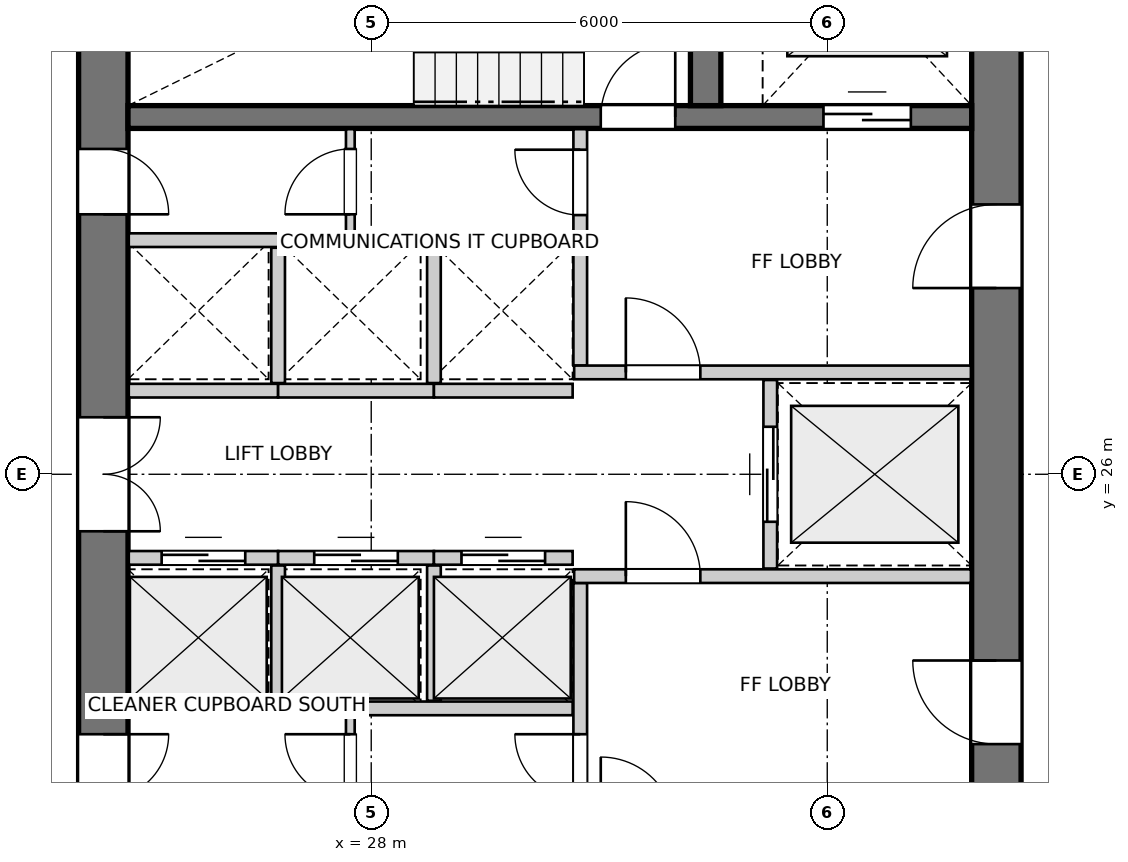
"""IFC4 building model, lengths in metres.
Left out: names, types, materials, properties, quantities, classifications, styles, units other than length and angle.
Written with IfcOpenShell. Run it as: python <this file> out.ifc"""

import sys

from ifc_helpers import new_model, si_unit, direction, frame, frame_2d, origin, place, context, subcontext, project, spatial, rectangle, extrude, source, transform, mapped, element, fill, save


model = new_model("IFC4")
c1 = context("Model", 3, precision=1e-05, world=origin(), true_north=direction((0.0, 1.0)))
c2 = subcontext(c1, "Body", "Model", "MODEL_VIEW")
j1 = project(units=[si_unit("LENGTHUNIT", "METRE"), si_unit("PLANEANGLEUNIT", "RADIAN")], contexts=[c1])
p1 = place(None, origin())
s1 = spatial("IfcSite", under=j1, at=p1, CompositionType="ELEMENT")
p2 = place(p1, origin())
s2 = spatial("IfcBuilding", under=s1, at=p2, CompositionType="ELEMENT")
p3 = place(p2, frame((0.0, 0.0, 112.0)))
s3 = spatial("IfcBuildingStorey", under=s2, at=p3, CompositionType="ELEMENT", Elevation=112.0)
p4 = place(p3, frame((24.475, 33.8, 0.0), z_axis=(0.0, 0.0, 1.0), x_axis=(0.0, -1.0, 0.0)))
e1 = element("IfcWall", 1, at=p4, inside=s3, PredefinedType="SHEAR", context=c2, shape_type="SweptSolid", body=[
    extrude(rectangle(XDim=15.6, YDim=0.65, at=frame_2d((7.8, 0.0))), origin(), (0.0, 0.0, 1.0), 2.935),
])
p5 = place(p4, frame((7.05, 0.0, 0.0)))
e2 = element("IfcOpeningElement", 2, at=p5, cuts=e1, PredefinedType="OPENING", context=c2, shape_type="SweptSolid", body=[
    extrude(rectangle(XDim=1.5, YDim=2.15, at=frame_2d((0.75, 1.075))), frame((0.0, 0.335, 0.0), z_axis=(0.0, -1.0, 0.0), x_axis=(1.0, 0.0, 0.0)), (0.0, 0.0, 1.0), 0.67),
])
p6 = place(p4, frame((3.52, 0.0, 0.0)))
e3 = element("IfcOpeningElement", 3, at=p6, cuts=e1, PredefinedType="OPENING", context=c2, shape_type="SweptSolid", body=[
    extrude(rectangle(XDim=0.86, YDim=2.05, at=frame_2d((0.43, 1.025))), frame((0.0, 0.335, 0.0), z_axis=(0.0, -1.0, 0.0), x_axis=(1.0, 0.0, 0.0)), (0.0, 0.0, 1.0), 0.67),
])
p7 = place(p4, frame((11.22, 0.0, 0.0)))
e4 = element("IfcOpeningElement", 4, at=p7, cuts=e1, PredefinedType="OPENING", context=c2, shape_type="SweptSolid", body=[
    extrude(rectangle(XDim=0.86, YDim=2.05, at=frame_2d((0.43, 1.025))), frame((0.0, 0.335, 0.0), z_axis=(0.0, -1.0, 0.0), x_axis=(1.0, 0.0, 0.0)), (0.0, 0.0, 1.0), 0.67),
])
p8 = place(p3, frame((36.225, 18.2, 0.0), z_axis=(0.0, 0.0, 1.0), x_axis=(0.0, 1.0, 0.0)))
e5 = element("IfcWall", 5, at=p8, inside=s3, PredefinedType="SHEAR", context=c2, shape_type="SweptSolid", body=[
    extrude(rectangle(XDim=15.6, YDim=0.65, at=frame_2d((7.8, 0.0))), origin(), (0.0, 0.0, 1.0), 2.935),
])
p9 = place(p8, frame((4.25, 0.0, 0.0)))
e6 = element("IfcOpeningElement", 6, at=p9, cuts=e5, PredefinedType="OPENING", context=c2, shape_type="SweptSolid", body=[
    extrude(rectangle(XDim=1.1, YDim=2.15, at=frame_2d((0.55, 1.075))), frame((0.0, 0.335, 0.0), z_axis=(0.0, -1.0, 0.0), x_axis=(1.0, 0.0, 0.0)), (0.0, 0.0, 1.0), 0.67),
])
p10 = place(p8, frame((10.25, 0.0, 0.0)))
e7 = element("IfcOpeningElement", 7, at=p10, cuts=e5, PredefinedType="OPENING", context=c2, shape_type="SweptSolid", body=[
    extrude(rectangle(XDim=1.1, YDim=2.15, at=frame_2d((0.55, 1.075))), frame((0.0, 0.335, 0.0), z_axis=(0.0, -1.0, 0.0), x_axis=(1.0, 0.0, 0.0)), (0.0, 0.0, 1.0), 0.67),
])
p11 = place(p3, frame((24.8, 30.7, 0.0), z_axis=(0.0, 0.0, 1.0), x_axis=(1.0, 0.0, 0.0)))
e8 = element("IfcWall", 8, at=p11, inside=s3, PredefinedType="SHEAR", context=c2, shape_type="SweptSolid", body=[
    extrude(rectangle(XDim=11.1, YDim=0.3, at=frame_2d((5.55, 0.0))), origin(), (0.0, 0.0, 1.0), 2.935),
])
p12 = place(p11, frame((6.22, 0.0, 0.0)))
e9 = element("IfcOpeningElement", 9, at=p12, cuts=e8, PredefinedType="OPENING", context=c2, shape_type="SweptSolid", body=[
    extrude(rectangle(XDim=0.98, YDim=2.15, at=frame_2d((0.49, 1.075))), frame((0.0, 0.16, 0.0), z_axis=(0.0, -1.0, 0.0), x_axis=(1.0, 0.0, 0.0)), (0.0, 0.0, 1.0), 0.32),
])
p13 = place(p11, frame((9.15, 0.0, 0.0)))
e10 = element("IfcOpeningElement", 10, at=p13, cuts=e8, PredefinedType="OPENING", context=c2, shape_type="SweptSolid", body=[
    extrude(rectangle(XDim=1.15, YDim=2.15, at=frame_2d((0.575, 1.075))), frame((0.0, 0.16, 0.0), z_axis=(0.0, -1.0, 0.0), x_axis=(1.0, 0.0, 0.0)), (0.0, 0.0, 1.0), 0.32),
])
p14 = place(p3, frame((32.4, 30.85, 0.0), z_axis=(0.0, 0.0, 1.0), x_axis=(0.0, 1.0, 0.0)))
e11 = element("IfcWall", 11, at=p14, inside=s3, PredefinedType="SHEAR", context=c2, shape_type="SweptSolid", body=[
    extrude(rectangle(XDim=2.95, YDim=0.4, at=frame_2d((1.475, 0.0))), origin(), (0.0, 0.0, 1.0), 2.935),
])
p15 = place(p3, frame((30.75, 21.46, 0.0), z_axis=(0.0, 0.0, 1.0), x_axis=(0.0, 1.0, 0.0)))
e12 = element("IfcWall", 12, at=p15, inside=s3, PredefinedType="PARTITIONING", context=c2, shape_type="SweptSolid", body=[
    extrude(rectangle(XDim=3.11, YDim=0.18, at=frame_2d((1.555, 0.0))), origin(), (0.0, 0.0, 1.0), 2.935),
])
p16 = place(p15, frame((0.26, 0.0, 0.0)))
e13 = element("IfcOpeningElement", 13, at=p16, cuts=e12, PredefinedType="OPENING", context=c2, shape_type="SweptSolid", body=[
    extrude(rectangle(XDim=0.86, YDim=2.05, at=frame_2d((0.43, 1.025))), frame((0.0, 0.1, 0.0), z_axis=(0.0, -1.0, 0.0), x_axis=(1.0, 0.0, 0.0)), (0.0, 0.0, 1.0), 0.2),
])
p17 = place(p3, frame((30.67, 24.66, 0.0), z_axis=(0.0, 0.0, 1.0), x_axis=(1.0, 0.0, 0.0)))
e14 = element("IfcWall", 14, at=p17, inside=s3, PredefinedType="PARTITIONING", context=c2, shape_type="SweptSolid", body=[
    extrude(rectangle(XDim=5.22, YDim=0.18, at=frame_2d((2.61, 0.0))), origin(), (0.0, 0.0, 1.0), 2.935),
])
p18 = place(p17, frame((0.68, 0.0, 0.0)))
e15 = element("IfcOpeningElement", 15, at=p18, cuts=e14, PredefinedType="OPENING", context=c2, shape_type="SweptSolid", body=[
    extrude(rectangle(XDim=0.98, YDim=2.15, at=frame_2d((0.49, 1.075))), frame((0.0, 0.1, 0.0), z_axis=(0.0, -1.0, 0.0), x_axis=(1.0, 0.0, 0.0)), (0.0, 0.0, 1.0), 0.2),
])
p19 = place(p3, frame((30.75, 27.43, 0.0), z_axis=(0.0, 0.0, 1.0), x_axis=(0.0, 1.0, 0.0)))
e16 = element("IfcWall", 16, at=p19, inside=s3, PredefinedType="PARTITIONING", context=c2, shape_type="SweptSolid", body=[
    extrude(rectangle(XDim=3.11, YDim=0.18, at=frame_2d((1.555, 0.0))), origin(), (0.0, 0.0, 1.0), 2.935),
])
p20 = place(p19, frame((1.98, 0.0, 0.0)))
e17 = element("IfcOpeningElement", 17, at=p20, cuts=e16, PredefinedType="OPENING", context=c2, shape_type="SweptSolid", body=[
    extrude(rectangle(XDim=0.86, YDim=2.05, at=frame_2d((0.43, 1.025))), frame((0.0, 0.1, 0.0), z_axis=(0.0, -1.0, 0.0), x_axis=(1.0, 0.0, 0.0)), (0.0, 0.0, 1.0), 0.2),
])
p21 = place(p3, frame((30.67, 27.34, 0.0), z_axis=(0.0, 0.0, 1.0), x_axis=(1.0, 0.0, 0.0)))
e18 = element("IfcWall", 18, at=p21, inside=s3, PredefinedType="PARTITIONING", context=c2, shape_type="SweptSolid", body=[
    extrude(rectangle(XDim=5.22, YDim=0.18, at=frame_2d((2.61, 0.0))), origin(), (0.0, 0.0, 1.0), 2.935),
])
p22 = place(p21, frame((0.68, 0.0, 0.0)))
e19 = element("IfcOpeningElement", 19, at=p22, cuts=e18, PredefinedType="OPENING", context=c2, shape_type="SweptSolid", body=[
    extrude(rectangle(XDim=0.98, YDim=2.15, at=frame_2d((0.49, 1.075))), frame((0.0, 0.1, 0.0), z_axis=(0.0, -1.0, 0.0), x_axis=(1.0, 0.0, 0.0)), (0.0, 0.0, 1.0), 0.2),
])
p23 = place(p3, frame((33.25, 24.76, 0.0), z_axis=(0.0, 0.0, 1.0), x_axis=(0.0, 1.0, 0.0)))
e20 = element("IfcWall", 20, at=p23, inside=s3, PredefinedType="PARTITIONING", context=c2, shape_type="SweptSolid", body=[
    extrude(rectangle(XDim=2.48, YDim=0.18, at=frame_2d((1.24, 0.0))), origin(), (0.0, 0.0, 1.0), 2.935),
])
p24 = place(p23, frame((0.615, 0.0, 0.0)))
e21 = element("IfcOpeningElement", 21, at=p24, cuts=e20, PredefinedType="OPENING", context=c2, shape_type="SweptSolid", body=[
    extrude(rectangle(XDim=1.25, YDim=2.15, at=frame_2d((0.625, 1.075))), frame((0.0, 0.1, 0.0), z_axis=(0.0, -1.0, 0.0), x_axis=(1.0, 0.0, 0.0)), (0.0, 0.0, 1.0), 0.2),
])
p25 = place(p3, frame((24.81, 22.92, 0.0), z_axis=(0.0, 0.0, 1.0), x_axis=(1.0, 0.0, 0.0)))
e22 = element("IfcWall", 22, at=p25, inside=s3, PredefinedType="PARTITIONING", context=c2, shape_type="SweptSolid", body=[
    extrude(rectangle(XDim=5.84, YDim=0.18, at=frame_2d((2.92, 0.0))), origin(), (0.0, 0.0, 1.0), 2.935),
])
p26 = place(p3, frame((24.81, 24.9, 0.0), z_axis=(0.0, 0.0, 1.0), x_axis=(1.0, 0.0, 0.0)))
e23 = element("IfcWall", 23, at=p26, inside=s3, PredefinedType="PARTITIONING", context=c2, shape_type="SweptSolid", body=[
    extrude(rectangle(XDim=1.965, YDim=0.18, at=frame_2d((0.982, 0.0))), origin(), (0.0, 0.0, 1.0), 2.935),
])
p27 = place(p26, frame((0.433, 0.0, 0.0)))
e24 = element("IfcOpeningElement", 24, at=p27, cuts=e23, PredefinedType="OPENING", context=c2, shape_type="SweptSolid", body=[
    extrude(rectangle(XDim=1.1, YDim=2.15, at=frame_2d((0.55, 1.075))), frame((0.0, 0.1, 0.0), z_axis=(0.0, -1.0, 0.0), x_axis=(1.0, 0.0, 0.0)), (0.0, 0.0, 1.0), 0.2),
])
p28 = place(p3, frame((26.775, 24.9, 0.0), z_axis=(0.0, 0.0, 1.0), x_axis=(1.0, 0.0, 0.0)))
e25 = element("IfcWall", 25, at=p28, inside=s3, PredefinedType="PARTITIONING", context=c2, shape_type="SweptSolid", body=[
    extrude(rectangle(XDim=2.05, YDim=0.18, at=frame_2d((1.025, 0.0))), origin(), (0.0, 0.0, 1.0), 2.935),
])
p29 = place(p28, frame((0.475, 0.0, 0.0)))
e26 = element("IfcOpeningElement", 26, at=p29, cuts=e25, PredefinedType="OPENING", context=c2, shape_type="SweptSolid", body=[
    extrude(rectangle(XDim=1.1, YDim=2.15, at=frame_2d((0.55, 1.075))), frame((0.0, 0.1, 0.0), z_axis=(0.0, -1.0, 0.0), x_axis=(1.0, 0.0, 0.0)), (0.0, 0.0, 1.0), 0.2),
])
p30 = place(p3, frame((26.775, 23.02, 0.0), z_axis=(0.0, 0.0, 1.0), x_axis=(0.0, 1.0, 0.0)))
e27 = element("IfcWall", 27, at=p30, inside=s3, PredefinedType="PARTITIONING", context=c2, shape_type="SweptSolid", body=[
    extrude(rectangle(XDim=1.78, YDim=0.18, at=frame_2d((0.89, 0.0))), origin(), (0.0, 0.0, 1.0), 2.935),
])
p31 = place(p3, frame((28.825, 24.9, 0.0), z_axis=(0.0, 0.0, 1.0), x_axis=(1.0, 0.0, 0.0)))
e28 = element("IfcWall", 28, at=p31, inside=s3, PredefinedType="PARTITIONING", context=c2, shape_type="SweptSolid", body=[
    extrude(rectangle(XDim=1.825, YDim=0.18, at=frame_2d((0.913, 0.0))), origin(), (0.0, 0.0, 1.0), 2.935),
])
p32 = place(p31, frame((0.363, 0.0, 0.0)))
e29 = element("IfcOpeningElement", 29, at=p32, cuts=e28, PredefinedType="OPENING", context=c2, shape_type="SweptSolid", body=[
    extrude(rectangle(XDim=1.1, YDim=2.15, at=frame_2d((0.55, 1.075))), frame((0.0, 0.1, 0.0), z_axis=(0.0, -1.0, 0.0), x_axis=(1.0, 0.0, 0.0)), (0.0, 0.0, 1.0), 0.2),
])
p33 = place(p3, frame((28.825, 23.02, 0.0), z_axis=(0.0, 0.0, 1.0), x_axis=(0.0, 1.0, 0.0)))
e30 = element("IfcWall", 30, at=p33, inside=s3, PredefinedType="PARTITIONING", context=c2, shape_type="SweptSolid", body=[
    extrude(rectangle(XDim=1.78, YDim=0.18, at=frame_2d((0.89, 0.0))), origin(), (0.0, 0.0, 1.0), 2.935),
])
p34 = place(p3, frame((24.81, 29.08, 0.0), z_axis=(0.0, 0.0, 1.0), x_axis=(1.0, 0.0, 0.0)))
e31 = element("IfcWall", 31, at=p34, inside=s3, PredefinedType="PARTITIONING", context=c2, shape_type="SweptSolid", body=[
    extrude(rectangle(XDim=5.84, YDim=0.18, at=frame_2d((2.92, 0.0))), origin(), (0.0, 0.0, 1.0), 2.935),
])
p35 = place(p3, frame((24.81, 27.1, 0.0), z_axis=(0.0, 0.0, 1.0), x_axis=(1.0, 0.0, 0.0)))
e32 = element("IfcWall", 32, at=p35, inside=s3, PredefinedType="PARTITIONING", context=c2, shape_type="SweptSolid", body=[
    extrude(rectangle(XDim=1.965, YDim=0.18, at=frame_2d((0.982, 0.0))), origin(), (0.0, 0.0, 1.0), 2.935),
])
p36 = place(p3, frame((26.775, 27.1, 0.0), z_axis=(0.0, 0.0, 1.0), x_axis=(1.0, 0.0, 0.0)))
e33 = element("IfcWall", 33, at=p36, inside=s3, PredefinedType="PARTITIONING", context=c2, shape_type="SweptSolid", body=[
    extrude(rectangle(XDim=2.05, YDim=0.18, at=frame_2d((1.025, 0.0))), origin(), (0.0, 0.0, 1.0), 2.935),
])
p37 = place(p3, frame((26.775, 27.2, 0.0), z_axis=(0.0, 0.0, 1.0), x_axis=(0.0, 1.0, 0.0)))
e34 = element("IfcWall", 34, at=p37, inside=s3, PredefinedType="PARTITIONING", context=c2, shape_type="SweptSolid", body=[
    extrude(rectangle(XDim=1.78, YDim=0.18, at=frame_2d((0.89, 0.0))), origin(), (0.0, 0.0, 1.0), 2.935),
])
p38 = place(p3, frame((28.825, 27.1, 0.0), z_axis=(0.0, 0.0, 1.0), x_axis=(1.0, 0.0, 0.0)))
e35 = element("IfcWall", 35, at=p38, inside=s3, PredefinedType="PARTITIONING", context=c2, shape_type="SweptSolid", body=[
    extrude(rectangle(XDim=1.825, YDim=0.18, at=frame_2d((0.913, 0.0))), origin(), (0.0, 0.0, 1.0), 2.935),
])
p39 = place(p3, frame((28.825, 27.2, 0.0), z_axis=(0.0, 0.0, 1.0), x_axis=(0.0, 1.0, 0.0)))
e36 = element("IfcWall", 36, at=p39, inside=s3, PredefinedType="PARTITIONING", context=c2, shape_type="SweptSolid", body=[
    extrude(rectangle(XDim=1.78, YDim=0.18, at=frame_2d((0.89, 0.0))), origin(), (0.0, 0.0, 1.0), 2.935),
])
p40 = place(p3, frame((27.725, 21.46, 0.0), z_axis=(0.0, 0.0, 1.0), x_axis=(0.0, 1.0, 0.0)))
e37 = element("IfcWall", 37, at=p40, inside=s3, PredefinedType="PARTITIONING", context=c2, shape_type="SweptSolid", body=[
    extrude(rectangle(XDim=1.38, YDim=0.115, at=frame_2d((0.69, 0.0))), origin(), (0.0, 0.0, 1.0), 2.935),
])
p41 = place(p40, frame((0.26, 0.0, 0.0)))
e38 = element("IfcOpeningElement", 38, at=p41, cuts=e37, PredefinedType="OPENING", context=c2, shape_type="SweptSolid", body=[
    extrude(rectangle(XDim=0.86, YDim=2.05, at=frame_2d((0.43, 1.025))), frame((0.0, 0.067, 0.0), z_axis=(0.0, -1.0, 0.0), x_axis=(1.0, 0.0, 0.0)), (0.0, 0.0, 1.0), 0.135),
])
p42 = place(p3, frame((27.725, 29.16, 0.0), z_axis=(0.0, 0.0, 1.0), x_axis=(0.0, 1.0, 0.0)))
e39 = element("IfcWall", 39, at=p42, inside=s3, PredefinedType="PARTITIONING", context=c2, shape_type="SweptSolid", body=[
    extrude(rectangle(XDim=1.38, YDim=0.115, at=frame_2d((0.69, 0.0))), origin(), (0.0, 0.0, 1.0), 2.935),
])
p43 = place(p42, frame((0.26, 0.0, 0.0)))
e40 = element("IfcOpeningElement", 40, at=p43, cuts=e39, PredefinedType="OPENING", context=c2, shape_type="SweptSolid", body=[
    extrude(rectangle(XDim=0.86, YDim=2.05, at=frame_2d((0.43, 1.025))), frame((0.0, 0.067, 0.0), z_axis=(0.0, -1.0, 0.0), x_axis=(1.0, 0.0, 0.0)), (0.0, 0.0, 1.0), 0.135),
])
m1 = source(origin(), c2, "Body", "SweptSolid", [
    extrude(rectangle(XDim=0.98, YDim=2.15, at=frame_2d((0.49, 1.075))), frame((0.0, 0.025, 0.0), z_axis=(0.0, -1.0, 0.0), x_axis=(1.0, 0.0, 0.0)), (0.0, 0.0, 1.0), 0.05),
])
p44 = place(p12, origin())
e41 = element("IfcDoor", 41, at=p44, inside=s3, OperationType="SINGLE_SWING_RIGHT", PredefinedType="DOOR", context=c2, shape_type="MappedRepresentation", body=[
    mapped(m1, transform((0.0, 0.0, 0.0), x_axis=(1.0, 0.0, 0.0), y_axis=(0.0, 1.0, 0.0), z_axis=(0.0, 0.0, 1.0), scale=1.0)),
])
fill(e9, e41)
m2 = source(origin(), c2, "Body", "SweptSolid", [
    extrude(rectangle(XDim=1.15, YDim=2.15, at=frame_2d((0.575, 1.075))), frame((0.0, 0.025, 0.0), z_axis=(0.0, -1.0, 0.0), x_axis=(1.0, 0.0, 0.0)), (0.0, 0.0, 1.0), 0.05),
])
p45 = place(p13, origin())
e42 = element("IfcDoor", 42, at=p45, inside=s3, OperationType="DOUBLE_DOOR_SLIDING", PredefinedType="DOOR", context=c2, shape_type="MappedRepresentation", body=[
    mapped(m2, transform((0.0, 0.0, 0.0), x_axis=(1.0, 0.0, 0.0), y_axis=(0.0, 1.0, 0.0), z_axis=(0.0, 0.0, 1.0), scale=1.0)),
])
fill(e10, e42)
m3 = source(origin(), c2, "Body", "SweptSolid", [
    extrude(rectangle(XDim=1.1, YDim=2.15, at=frame_2d((0.55, 1.075))), frame((0.0, 0.025, 0.0), z_axis=(0.0, -1.0, 0.0), x_axis=(1.0, 0.0, 0.0)), (0.0, 0.0, 1.0), 0.05),
])
p46 = place(p9, origin())
e43 = element("IfcDoor", 43, at=p46, inside=s3, OperationType="SINGLE_SWING_RIGHT", PredefinedType="DOOR", context=c2, shape_type="MappedRepresentation", body=[
    mapped(m3, transform((0.0, 0.0, 0.0), x_axis=(1.0, 0.0, 0.0), y_axis=(0.0, 1.0, 0.0), z_axis=(0.0, 0.0, 1.0), scale=1.0)),
])
fill(e6, e43)
p47 = place(p10, origin())
e44 = element("IfcDoor", 44, at=p47, inside=s3, OperationType="SINGLE_SWING_LEFT", PredefinedType="DOOR", context=c2, shape_type="MappedRepresentation", body=[
    mapped(m3, transform((0.0, 0.0, 0.0), x_axis=(1.0, 0.0, 0.0), y_axis=(0.0, 1.0, 0.0), z_axis=(0.0, 0.0, 1.0), scale=1.0)),
])
fill(e7, e44)
m4 = source(origin(), c2, "Body", "SweptSolid", [
    extrude(rectangle(XDim=1.5, YDim=2.15, at=frame_2d((0.75, 1.075))), frame((0.0, 0.025, 0.0), z_axis=(0.0, -1.0, 0.0), x_axis=(1.0, 0.0, 0.0)), (0.0, 0.0, 1.0), 0.05),
])
p48 = place(p5, origin())
e45 = element("IfcDoor", 45, at=p48, inside=s3, OperationType="DOUBLE_DOOR_SINGLE_SWING", PredefinedType="DOOR", context=c2, shape_type="MappedRepresentation", body=[
    mapped(m4, transform((0.0, 0.0, 0.0), x_axis=(1.0, 0.0, 0.0), y_axis=(0.0, 1.0, 0.0), z_axis=(0.0, 0.0, 1.0), scale=1.0)),
])
fill(e2, e45)
m5 = source(origin(), c2, "Body", "SweptSolid", [
    extrude(rectangle(XDim=0.86, YDim=2.05, at=frame_2d((0.43, 1.025))), frame((0.0, 0.025, 0.0), z_axis=(0.0, -1.0, 0.0), x_axis=(1.0, 0.0, 0.0)), (0.0, 0.0, 1.0), 0.05),
])
p49 = place(p6, origin())
e46 = element("IfcDoor", 46, at=p49, inside=s3, OperationType="SINGLE_SWING_RIGHT", PredefinedType="DOOR", context=c2, shape_type="MappedRepresentation", body=[
    mapped(m5, transform((0.0, 0.0, 0.0), x_axis=(1.0, 0.0, 0.0), y_axis=(0.0, 1.0, 0.0), z_axis=(0.0, 0.0, 1.0), scale=1.0)),
])
fill(e3, e46)
p50 = place(p7, origin())
e47 = element("IfcDoor", 47, at=p50, inside=s3, OperationType="SINGLE_SWING_LEFT", PredefinedType="DOOR", context=c2, shape_type="MappedRepresentation", body=[
    mapped(m5, transform((0.0, 0.0, 0.0), x_axis=(1.0, 0.0, 0.0), y_axis=(0.0, 1.0, 0.0), z_axis=(0.0, 0.0, 1.0), scale=1.0)),
])
fill(e4, e47)
p51 = place(p16, origin())
e48 = element("IfcDoor", 48, at=p51, inside=s3, OperationType="SINGLE_SWING_RIGHT", PredefinedType="DOOR", context=c2, shape_type="MappedRepresentation", body=[
    mapped(m5, transform((0.0, 0.0, 0.0), x_axis=(1.0, 0.0, 0.0), y_axis=(0.0, 1.0, 0.0), z_axis=(0.0, 0.0, 1.0), scale=1.0)),
])
fill(e13, e48)
p52 = place(p18, origin())
e49 = element("IfcDoor", 49, at=p52, inside=s3, OperationType="SINGLE_SWING_LEFT", PredefinedType="DOOR", context=c2, shape_type="MappedRepresentation", body=[
    mapped(m1, transform((0.0, 0.0, 0.0), x_axis=(1.0, 0.0, 0.0), y_axis=(0.0, 1.0, 0.0), z_axis=(0.0, 0.0, 1.0), scale=1.0)),
])
fill(e15, e49)
p53 = place(p20, origin())
e50 = element("IfcDoor", 50, at=p53, inside=s3, OperationType="SINGLE_SWING_RIGHT", PredefinedType="DOOR", context=c2, shape_type="MappedRepresentation", body=[
    mapped(m5, transform((0.0, 0.0, 0.0), x_axis=(1.0, 0.0, 0.0), y_axis=(0.0, 1.0, 0.0), z_axis=(0.0, 0.0, 1.0), scale=1.0)),
])
fill(e17, e50)
p54 = place(p22, origin())
e51 = element("IfcDoor", 51, at=p54, inside=s3, OperationType="SINGLE_SWING_LEFT", PredefinedType="DOOR", context=c2, shape_type="MappedRepresentation", body=[
    mapped(m1, transform((0.0, 0.0, 0.0), x_axis=(1.0, 0.0, 0.0), y_axis=(0.0, 1.0, 0.0), z_axis=(0.0, 0.0, 1.0), scale=1.0)),
])
fill(e19, e51)
m6 = source(origin(), c2, "Body", "SweptSolid", [
    extrude(rectangle(XDim=1.25, YDim=2.15, at=frame_2d((0.625, 1.075))), frame((0.0, 0.025, 0.0), z_axis=(0.0, -1.0, 0.0), x_axis=(1.0, 0.0, 0.0)), (0.0, 0.0, 1.0), 0.05),
])
p55 = place(p24, origin())
e52 = element("IfcDoor", 52, at=p55, inside=s3, OperationType="DOUBLE_DOOR_SLIDING", PredefinedType="DOOR", context=c2, shape_type="MappedRepresentation", body=[
    mapped(m6, transform((0.0, 0.0, 0.0), x_axis=(1.0, 0.0, 0.0), y_axis=(0.0, 1.0, 0.0), z_axis=(0.0, 0.0, 1.0), scale=1.0)),
])
fill(e21, e52)
p56 = place(p27, origin())
e53 = element("IfcDoor", 53, at=p56, inside=s3, OperationType="DOUBLE_DOOR_SLIDING", PredefinedType="DOOR", context=c2, shape_type="MappedRepresentation", body=[
    mapped(m3, transform((0.0, 0.0, 0.0), x_axis=(1.0, 0.0, 0.0), y_axis=(0.0, 1.0, 0.0), z_axis=(0.0, 0.0, 1.0), scale=1.0)),
])
fill(e24, e53)
p57 = place(p29, origin())
e54 = element("IfcDoor", 54, at=p57, inside=s3, OperationType="DOUBLE_DOOR_SLIDING", PredefinedType="DOOR", context=c2, shape_type="MappedRepresentation", body=[
    mapped(m3, transform((0.0, 0.0, 0.0), x_axis=(1.0, 0.0, 0.0), y_axis=(0.0, 1.0, 0.0), z_axis=(0.0, 0.0, 1.0), scale=1.0)),
])
fill(e26, e54)
p58 = place(p32, origin())
e55 = element("IfcDoor", 55, at=p58, inside=s3, OperationType="DOUBLE_DOOR_SLIDING", PredefinedType="DOOR", context=c2, shape_type="MappedRepresentation", body=[
    mapped(m3, transform((0.0, 0.0, 0.0), x_axis=(1.0, 0.0, 0.0), y_axis=(0.0, 1.0, 0.0), z_axis=(0.0, 0.0, 1.0), scale=1.0)),
])
fill(e29, e55)
p59 = place(p41, origin())
e56 = element("IfcDoor", 56, at=p59, inside=s3, OperationType="SINGLE_SWING_RIGHT", PredefinedType="DOOR", context=c2, shape_type="MappedRepresentation", body=[
    mapped(m5, transform((0.0, 0.0, 0.0), x_axis=(1.0, 0.0, 0.0), y_axis=(0.0, 1.0, 0.0), z_axis=(0.0, 0.0, 1.0), scale=1.0)),
])
fill(e38, e56)
p60 = place(p43, origin())
e57 = element("IfcDoor", 57, at=p60, inside=s3, OperationType="SINGLE_SWING_LEFT", PredefinedType="DOOR", context=c2, shape_type="MappedRepresentation", body=[
    mapped(m5, transform((0.0, 0.0, 0.0), x_axis=(1.0, 0.0, 0.0), y_axis=(0.0, 1.0, 0.0), z_axis=(0.0, 0.0, 1.0), scale=1.0)),
])
fill(e40, e57)
save(model, sys.argv[1])
